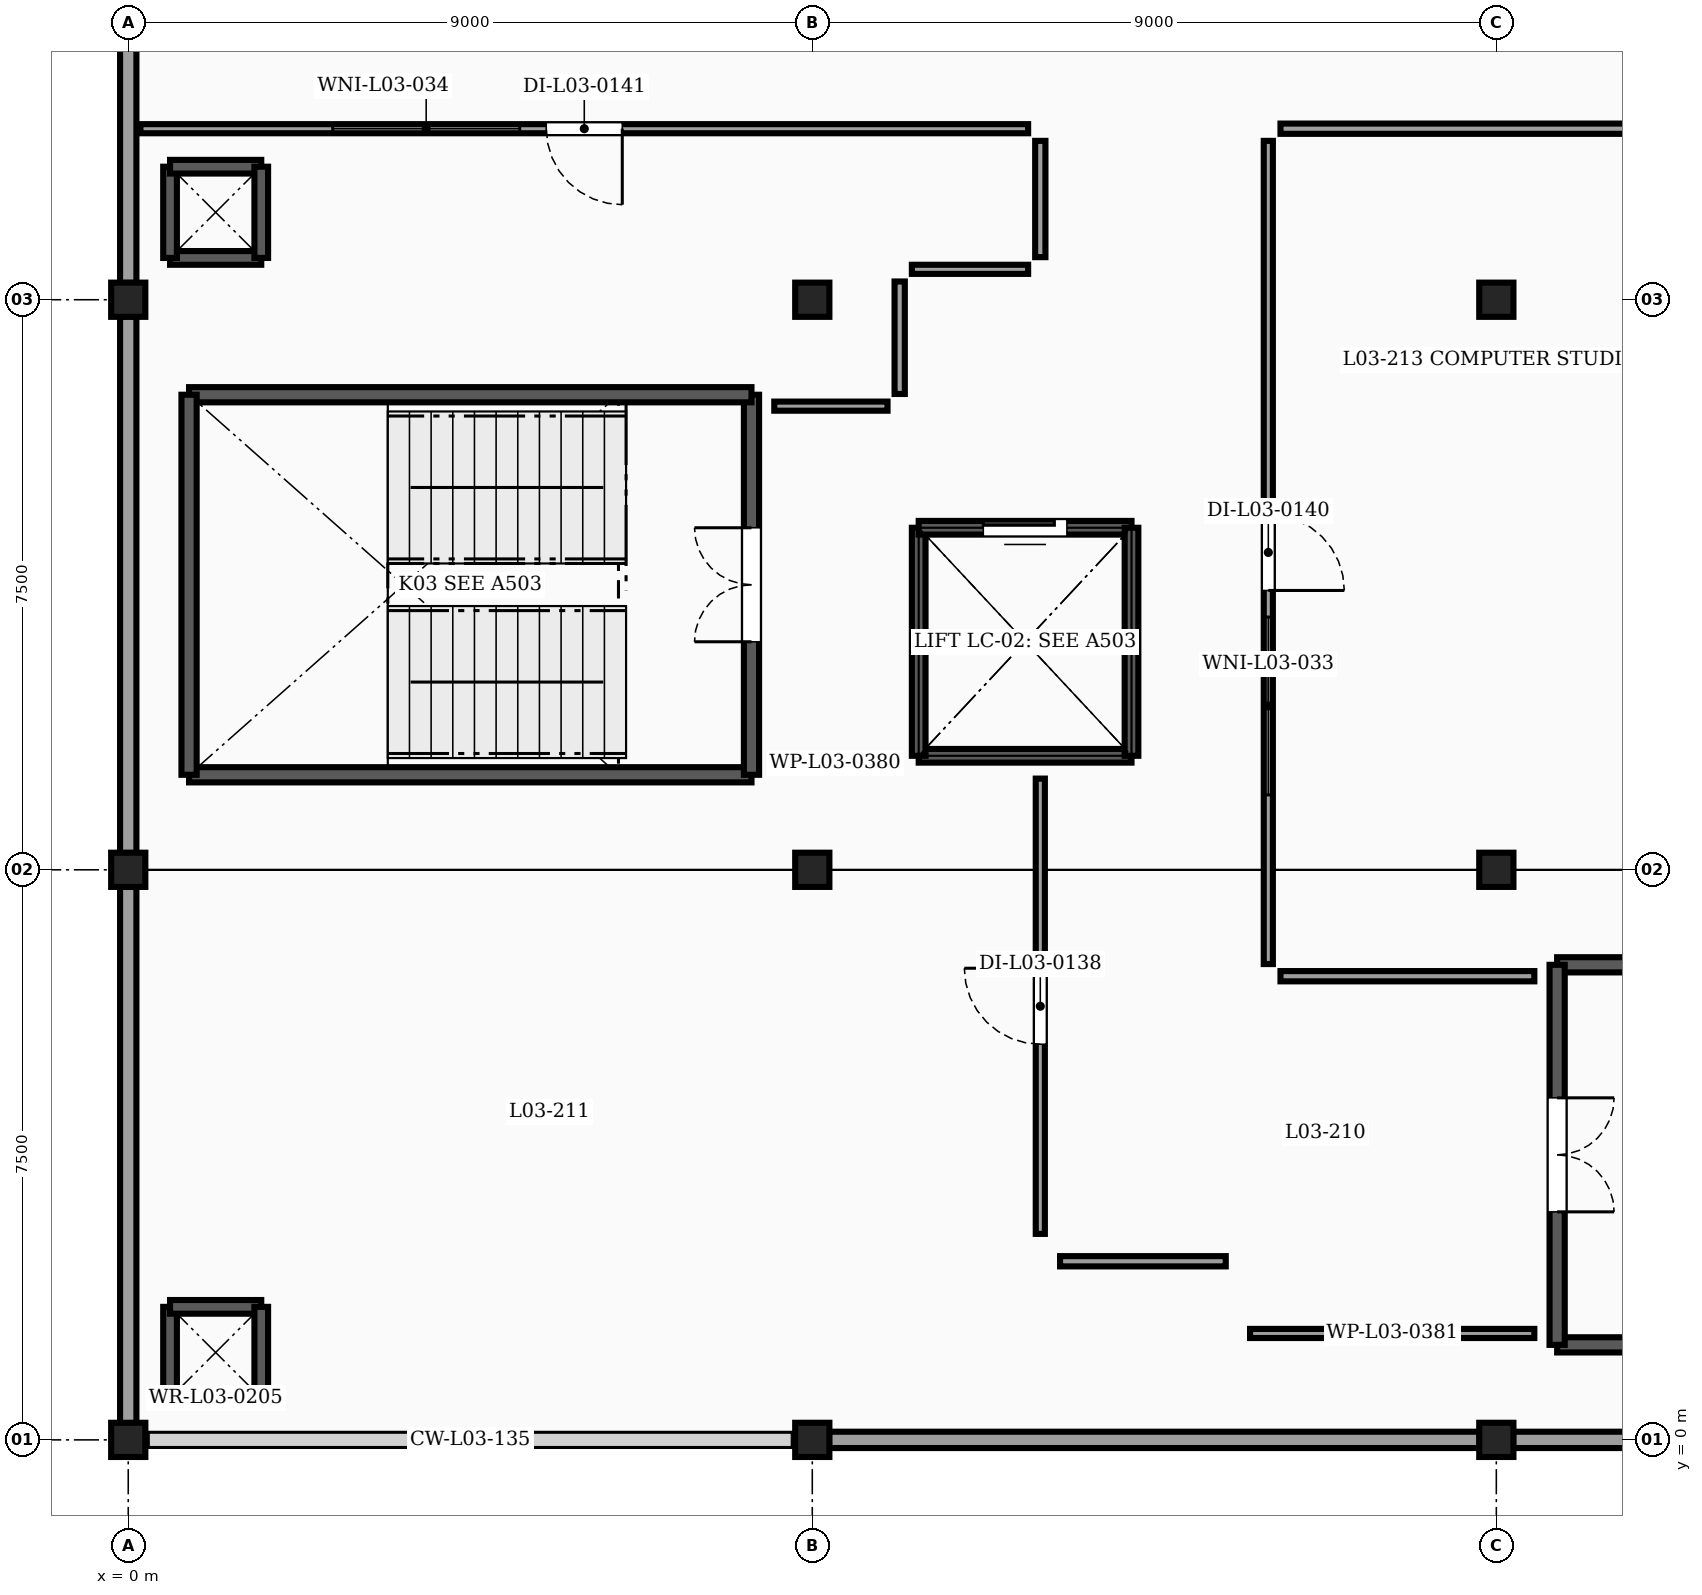
"""IFC4 building model, lengths in metres.
Left out: names, types, materials, properties, quantities, classifications, styles, units other than length and angle.
Written with IfcOpenShell. Run it as: python <this file> out.ifc"""

import sys

from ifc_helpers import new_model, si_unit, direction, frame, frame_2d, origin, origin_2d, place, context, subcontext, project, spatial, rectangle, extrude, element, fill, save


model = new_model("IFC4")
c1 = context("Model", 3, precision=1e-05, world=origin(), true_north=direction((0.0, 1.0)))
c2 = subcontext(c1, "Body", "Model", "MODEL_VIEW")
j1 = project(units=[si_unit("LENGTHUNIT", "METRE"), si_unit("PLANEANGLEUNIT", "RADIAN")], contexts=[c1])
p1 = place(None, origin())
s1 = spatial("IfcSite", under=j1, at=p1, CompositionType="ELEMENT")
p2 = place(p1, origin())
s2 = spatial("IfcBuilding", under=s1, at=p2, CompositionType="ELEMENT")
p3 = place(p2, frame((0.0, 0.0, 12.3)))
s3 = spatial("IfcBuildingStorey", under=s2, at=p3, CompositionType="ELEMENT", Elevation=12.3)
for number, where, z_axis, x_axis in (
    (1, (0.0, 0.0, 0.0), (0.0, 0.0, 1.0), (1.0, 0.0, 0.0)),
    (2, (9.0, 0.0, 0.0), (0.0, 0.0, 1.0), (1.0, 0.0, 0.0)),
    (3, (18.0, 0.0, 0.0), (0.0, 0.0, 1.0), (1.0, 0.0, 0.0)),
    (4, (0.0, 7.5, 0.0), (0.0, 0.0, 1.0), (1.0, 0.0, 0.0)),
    (5, (9.0, 7.5, 0.0), (0.0, 0.0, 1.0), (1.0, 0.0, 0.0)),
    (6, (18.0, 7.5, 0.0), (0.0, 0.0, 1.0), (1.0, 0.0, 0.0)),
    (7, (0.0, 15.0, 0.0), (0.0, 0.0, 1.0), (1.0, 0.0, 0.0)),
    (8, (9.0, 15.0, 0.0), (0.0, 0.0, 1.0), (1.0, 0.0, 0.0)),
    (9, (18.0, 15.0, 0.0), (0.0, 0.0, 1.0), (1.0, 0.0, 0.0)),
):
    element("IfcColumn", number, at=place(p3, frame(where, z_axis=z_axis, x_axis=x_axis)), inside=s3, PredefinedType="COLUMN", context=c2, shape_type="SweptSolid", body=[
        extrude(rectangle(XDim=0.45, YDim=0.45, at=origin_2d()), origin(), (0.0, 0.0, 1.0), 3.8),
    ])
for number, where, z_axis, x_axis in (
    (10, (26.779, 0.0, 0.0), (0.0, 0.0, 1.0), (-1.0, 0.0, 0.0)),
    (11, (17.779, 0.0, 0.0), (0.0, 0.0, 1.0), (-1.0, 0.0, 0.0)),
):
    element("IfcWall", number, at=place(p3, frame(where, z_axis=z_axis, x_axis=x_axis)), inside=s3, PredefinedType="SOLIDWALL", context=c2, shape_type="SweptSolid", body=[
        extrude(rectangle(XDim=8.558, YDim=0.215, at=frame_2d((4.279, 0.0))), origin(), (0.0, 0.0, 1.0), 2.997),
    ])
for number, where, z_axis, x_axis in (
    (12, (0.0, 0.221, 0.0), (0.0, 0.0, 1.0), (0.0, 1.0, 0.0)),
    (13, (0.0, 7.721, 0.0), (0.0, 0.0, 1.0), (0.0, 1.0, 0.0)),
    (14, (0.0, 15.221, 0.0), (0.0, 0.0, 1.0), (0.0, 1.0, 0.0)),
):
    element("IfcWall", number, at=place(p3, frame(where, z_axis=z_axis, x_axis=x_axis)), inside=s3, PredefinedType="SOLIDWALL", context=c2, shape_type="SweptSolid", body=[
        extrude(rectangle(XDim=7.058, YDim=0.215, at=frame_2d((3.529, 0.0))), origin(), (0.0, 0.0, 1.0), 2.997),
    ])
for number, where, z_axis, x_axis in (
    (15, (1.75, 0.55, 0.0), (0.0, 0.0, 1.0), (-1.0, 0.0, 0.0)),
    (16, (0.55, 0.55, 0.0), (0.0, 0.0, 1.0), (0.0, 1.0, 0.0)),
    (17, (0.55, 1.75, 0.0), (0.0, 0.0, 1.0), (1.0, 0.0, 0.0)),
    (18, (1.75, 1.75, 0.0), (0.0, 0.0, 1.0), (0.0, -1.0, 0.0)),
    (19, (1.75, 15.55, 0.0), (0.0, 0.0, 1.0), (-1.0, 0.0, 0.0)),
    (20, (0.55, 15.55, 0.0), (0.0, 0.0, 1.0), (0.0, 1.0, 0.0)),
    (21, (0.55, 16.75, 0.0), (0.0, 0.0, 1.0), (1.0, 0.0, 0.0)),
    (22, (1.75, 16.75, 0.0), (0.0, 0.0, 1.0), (0.0, -1.0, 0.0)),
):
    element("IfcWall", number, at=place(p3, frame(where, z_axis=z_axis, x_axis=x_axis)), inside=s3, PredefinedType="SHEAR", context=c2, shape_type="SweptSolid", body=[
        extrude(rectangle(XDim=1.2, YDim=0.18, at=frame_2d((0.6, 0.0))), origin(), (0.0, 0.0, 1.0), 3.59),
    ])
p4 = place(p3, frame((0.8, 8.75, 0.0), z_axis=(0.0, 0.0, 1.0), x_axis=(1.0, 0.0, 0.0)))
e23 = element("IfcWall", 23, at=p4, inside=s3, PredefinedType="SHEAR", context=c2, shape_type="SweptSolid", body=[
    extrude(rectangle(XDim=7.4, YDim=0.2, at=frame_2d((3.7, 0.0))), origin(), (0.0, 0.0, 1.0), 3.59),
])
p5 = place(p3, frame((8.2, 8.75, 0.0), z_axis=(0.0, 0.0, 1.0), x_axis=(0.0, 1.0, 0.0)))
e24 = element("IfcWall", 24, at=p5, inside=s3, PredefinedType="SHEAR", context=c2, shape_type="SweptSolid", body=[
    extrude(rectangle(XDim=5.0, YDim=0.2, at=frame_2d((2.5, 0.0))), origin(), (0.0, 0.0, 1.0), 3.59),
])
p6 = place(p5, frame((1.75, 0.0, 0.0)))
e25 = element("IfcOpeningElement", 25, at=p6, cuts=e24, PredefinedType="OPENING", context=c2, shape_type="SweptSolid", body=[
    extrude(rectangle(XDim=1.5, YDim=2.15, at=frame_2d((0.75, 1.075))), frame((0.0, 0.11, 0.0), z_axis=(0.0, -1.0, 0.0), x_axis=(1.0, 0.0, 0.0)), (0.0, 0.0, 1.0), 0.22),
])
p7 = place(p3, frame((8.2, 13.75, 0.0), z_axis=(0.0, 0.0, 1.0), x_axis=(-1.0, 0.0, 0.0)))
e26 = element("IfcWall", 26, at=p7, inside=s3, PredefinedType="SHEAR", context=c2, shape_type="SweptSolid", body=[
    extrude(rectangle(XDim=7.4, YDim=0.2, at=frame_2d((3.7, 0.0))), origin(), (0.0, 0.0, 1.0), 3.59),
])
p8 = place(p3, frame((0.8, 13.75, 0.0), z_axis=(0.0, 0.0, 1.0), x_axis=(0.0, -1.0, 0.0)))
e27 = element("IfcWall", 27, at=p8, inside=s3, PredefinedType="SHEAR", context=c2, shape_type="SweptSolid", body=[
    extrude(rectangle(XDim=5.0, YDim=0.2, at=frame_2d((2.5, 0.0))), origin(), (0.0, 0.0, 1.0), 3.59),
])
for number, where, z_axis, x_axis in (
    (28, (18.8, 1.25, 0.0), (0.0, 0.0, 1.0), (1.0, 0.0, 0.0)),
    (29, (26.2, 6.25, 0.0), (0.0, 0.0, 1.0), (-1.0, 0.0, 0.0)),
):
    element("IfcWall", number, at=place(p3, frame(where, z_axis=z_axis, x_axis=x_axis)), inside=s3, PredefinedType="SHEAR", context=c2, shape_type="SweptSolid", body=[
        extrude(rectangle(XDim=7.4, YDim=0.2, at=frame_2d((3.7, 0.0))), origin(), (0.0, 0.0, 1.0), 3.59),
    ])
p9 = place(p3, frame((18.8, 6.25, 0.0), z_axis=(0.0, 0.0, 1.0), x_axis=(0.0, -1.0, 0.0)))
e30 = element("IfcWall", 30, at=p9, inside=s3, PredefinedType="SHEAR", context=c2, shape_type="SweptSolid", body=[
    extrude(rectangle(XDim=5.0, YDim=0.2, at=frame_2d((2.5, 0.0))), origin(), (0.0, 0.0, 1.0), 3.59),
])
p10 = place(p9, frame((1.75, 0.0, 0.0)))
e31 = element("IfcOpeningElement", 31, at=p10, cuts=e30, PredefinedType="OPENING", context=c2, shape_type="SweptSolid", body=[
    extrude(rectangle(XDim=1.5, YDim=2.15, at=frame_2d((0.75, 1.075))), frame((0.0, 0.11, 0.0), z_axis=(0.0, -1.0, 0.0), x_axis=(1.0, 0.0, 0.0)), (0.0, 0.0, 1.0), 0.22),
])
p11 = place(p3, frame((13.2, 9.0, 0.0), z_axis=(0.0, 0.0, 1.0), x_axis=(-1.0, 0.0, 0.0)))
e32 = element("IfcWall", 32, at=p11, inside=s3, PredefinedType="SHEAR", context=c2, shape_type="SweptSolid", body=[
    extrude(rectangle(XDim=2.8, YDim=0.18, at=frame_2d((1.4, 0.0))), origin(), (0.0, 0.0, 1.0), 3.59),
])
p12 = place(p3, frame((10.4, 9.0, 0.0), z_axis=(0.0, 0.0, 1.0), x_axis=(0.0, 1.0, 0.0)))
e33 = element("IfcWall", 33, at=p12, inside=s3, PredefinedType="SHEAR", context=c2, shape_type="SweptSolid", body=[
    extrude(rectangle(XDim=3.0, YDim=0.18, at=frame_2d((1.5, 0.0))), origin(), (0.0, 0.0, 1.0), 3.59),
])
p13 = place(p3, frame((10.4, 12.0, 0.0), z_axis=(0.0, 0.0, 1.0), x_axis=(1.0, 0.0, 0.0)))
e34 = element("IfcWall", 34, at=p13, inside=s3, PredefinedType="SHEAR", context=c2, shape_type="SweptSolid", body=[
    extrude(rectangle(XDim=2.8, YDim=0.18, at=frame_2d((1.4, 0.0))), origin(), (0.0, 0.0, 1.0), 3.59),
])
p14 = place(p13, frame((0.85, 0.0, 0.0)))
e35 = element("IfcOpeningElement", 35, at=p14, cuts=e34, PredefinedType="OPENING", context=c2, shape_type="SweptSolid", body=[
    extrude(rectangle(XDim=1.1, YDim=2.15, at=frame_2d((0.55, 1.075))), frame((0.0, 0.1, 0.0), z_axis=(0.0, -1.0, 0.0), x_axis=(1.0, 0.0, 0.0)), (0.0, 0.0, 1.0), 0.2),
])
p15 = place(p3, frame((13.2, 12.0, 0.0), z_axis=(0.0, 0.0, 1.0), x_axis=(0.0, -1.0, 0.0)))
e36 = element("IfcWall", 36, at=p15, inside=s3, PredefinedType="SHEAR", context=c2, shape_type="SweptSolid", body=[
    extrude(rectangle(XDim=3.0, YDim=0.18, at=frame_2d((1.5, 0.0))), origin(), (0.0, 0.0, 1.0), 3.59),
])
p16 = place(p3, frame((10.1, 8.9, 0.0), z_axis=(0.0, 0.0, 1.0), x_axis=(-1.0, 0.0, 0.0)))
e37 = element("IfcWall", 37, at=p16, inside=s3, PredefinedType="PARTITIONING", context=c2, shape_type="SweptSolid", body=[
    extrude(rectangle(XDim=1.6, YDim=0.135, at=frame_2d((0.8, 0.0))), origin(), (0.0, 0.0, 1.0), 3.59),
])
p17 = place(p3, frame((18.5, 1.4, 0.0), z_axis=(0.0, 0.0, 1.0), x_axis=(-1.0, 0.0, 0.0)))
e38 = element("IfcWall", 38, at=p17, inside=s3, PredefinedType="PARTITIONING", context=c2, shape_type="SweptSolid", body=[
    extrude(rectangle(XDim=3.74, YDim=0.12, at=frame_2d((1.87, 0.0))), origin(), (0.0, 0.0, 1.0), 3.59),
])
p18 = place(p3, frame((14.44, 2.35, 0.0), z_axis=(0.0, 0.0, 1.0), x_axis=(-1.0, 0.0, 0.0)))
e39 = element("IfcWall", 39, at=p18, inside=s3, PredefinedType="PARTITIONING", context=c2, shape_type="SweptSolid", body=[
    extrude(rectangle(XDim=2.18, YDim=0.135, at=frame_2d((1.09, 0.0))), origin(), (0.0, 0.0, 1.0), 3.59),
])
p19 = place(p3, frame((12.0, 2.71, 0.0), z_axis=(0.0, 0.0, 1.0), x_axis=(0.0, 1.0, 0.0)))
e40 = element("IfcWall", 40, at=p19, inside=s3, PredefinedType="PARTITIONING", context=c2, shape_type="SweptSolid", body=[
    extrude(rectangle(XDim=5.99, YDim=0.12, at=frame_2d((2.995, 0.0))), origin(), (0.0, 0.0, 1.0), 3.222),
])
p20 = place(p19, frame((2.495, 0.0, 0.0)))
e41 = element("IfcOpeningElement", 41, at=p20, cuts=e40, PredefinedType="OPENING", context=c2, shape_type="SweptSolid", body=[
    extrude(rectangle(XDim=1.0, YDim=2.15, at=frame_2d((0.5, 1.075))), frame((0.0, 0.07, 0.0), z_axis=(0.0, -1.0, 0.0), x_axis=(1.0, 0.0, 0.0)), (0.0, 0.0, 1.0), 0.14),
])
p21 = place(p3, frame((20.84, 17.25, 0.0), z_axis=(0.0, 0.0, 1.0), x_axis=(-1.0, 0.0, 0.0)))
e42 = element("IfcWall", 42, at=p21, inside=s3, PredefinedType="PARTITIONING", context=c2, shape_type="SweptSolid", body=[
    extrude(rectangle(XDim=5.68, YDim=0.135, at=frame_2d((2.84, 0.0))), origin(), (0.0, 0.0, 1.0), 3.59),
])
p22 = place(p3, frame((15.0, 17.09, 0.0), z_axis=(0.0, 0.0, 1.0), x_axis=(0.0, -1.0, 0.0)))
e43 = element("IfcWall", 43, at=p22, inside=s3, PredefinedType="PARTITIONING", context=c2, shape_type="SweptSolid", body=[
    extrude(rectangle(XDim=10.83, YDim=0.12, at=frame_2d((5.415, 0.0))), origin(), (0.0, 0.0, 1.0), 3.222),
])
p23 = place(p22, frame((4.915, 0.0, 0.0)))
e44 = element("IfcOpeningElement", 44, at=p23, cuts=e43, PredefinedType="OPENING", context=c2, shape_type="SweptSolid", body=[
    extrude(rectangle(XDim=1.0, YDim=2.15, at=frame_2d((0.5, 1.075))), frame((0.0, 0.07, 0.0), z_axis=(0.0, -1.0, 0.0), x_axis=(1.0, 0.0, 0.0)), (0.0, 0.0, 1.0), 0.14),
])
p24 = place(p22, frame((6.265, 0.0, 1.02)))
e45 = element("IfcOpeningElement", 45, at=p24, cuts=e43, PredefinedType="OPENING", context=c2, shape_type="SweptSolid", body=[
    extrude(rectangle(XDim=2.34, YDim=1.18, at=frame_2d((1.17, 0.59))), frame((0.0, 0.07, 0.0), z_axis=(0.0, -1.0, 0.0), x_axis=(1.0, 0.0, 0.0)), (0.0, 0.0, 1.0), 0.14),
])
p25 = place(p3, frame((15.16, 6.1, 0.0), z_axis=(0.0, 0.0, 1.0), x_axis=(1.0, 0.0, 0.0)))
e46 = element("IfcWall", 46, at=p25, inside=s3, PredefinedType="PARTITIONING", context=c2, shape_type="SweptSolid", body=[
    extrude(rectangle(XDim=3.34, YDim=0.135, at=frame_2d((1.67, 0.0))), origin(), (0.0, 0.0, 1.0), 3.59),
])
p26 = place(p3, frame((8.5, 13.6, 0.0), z_axis=(0.0, 0.0, 1.0), x_axis=(1.0, 0.0, 0.0)))
e47 = element("IfcWall", 47, at=p26, inside=s3, PredefinedType="PARTITIONING", context=c2, shape_type="SweptSolid", body=[
    extrude(rectangle(XDim=1.49, YDim=0.12, at=frame_2d((0.745, 0.0))), origin(), (0.0, 0.0, 1.0), 3.59),
])
p27 = place(p3, frame((10.15, 13.76, 0.0), z_axis=(0.0, 0.0, 1.0), x_axis=(0.0, 1.0, 0.0)))
e48 = element("IfcWall", 48, at=p27, inside=s3, PredefinedType="PARTITIONING", context=c2, shape_type="SweptSolid", body=[
    extrude(rectangle(XDim=1.48, YDim=0.135, at=frame_2d((0.74, 0.0))), origin(), (0.0, 0.0, 1.0), 3.59),
])
p28 = place(p3, frame((10.31, 15.4, 0.0), z_axis=(0.0, 0.0, 1.0), x_axis=(1.0, 0.0, 0.0)))
e49 = element("IfcWall", 49, at=p28, inside=s3, PredefinedType="PARTITIONING", context=c2, shape_type="SweptSolid", body=[
    extrude(rectangle(XDim=1.53, YDim=0.12, at=frame_2d((0.765, 0.0))), origin(), (0.0, 0.0, 1.0), 3.59),
])
p29 = place(p3, frame((12.0, 15.56, 0.0), z_axis=(0.0, 0.0, 1.0), x_axis=(0.0, 1.0, 0.0)))
e50 = element("IfcWall", 50, at=p29, inside=s3, PredefinedType="PARTITIONING", context=c2, shape_type="SweptSolid", body=[
    extrude(rectangle(XDim=1.53, YDim=0.135, at=frame_2d((0.765, 0.0))), origin(), (0.0, 0.0, 1.0), 3.222),
])
p30 = place(p3, frame((11.84, 17.25, 0.0), z_axis=(0.0, 0.0, 1.0), x_axis=(-1.0, 0.0, 0.0)))
e51 = element("IfcWall", 51, at=p30, inside=s3, PredefinedType="PARTITIONING", context=c2, shape_type="SweptSolid", body=[
    extrude(rectangle(XDim=11.68, YDim=0.12, at=frame_2d((5.84, 0.0))), origin(), (0.0, 0.0, 1.0), 3.59),
])
p31 = place(p30, frame((5.34, 0.0, 0.0)))
e52 = element("IfcOpeningElement", 52, at=p31, cuts=e51, PredefinedType="OPENING", context=c2, shape_type="SweptSolid", body=[
    extrude(rectangle(XDim=1.0, YDim=2.15, at=frame_2d((0.5, 1.075))), frame((0.0, 0.07, 0.0), z_axis=(0.0, -1.0, 0.0), x_axis=(1.0, 0.0, 0.0)), (0.0, 0.0, 1.0), 0.14),
])
p32 = place(p30, frame((6.69, 0.0, 1.02)))
e53 = element("IfcOpeningElement", 53, at=p32, cuts=e51, PredefinedType="OPENING", context=c2, shape_type="SweptSolid", body=[
    extrude(rectangle(XDim=2.46, YDim=1.16, at=frame_2d((1.23, 0.58))), frame((0.0, 0.07, 0.0), z_axis=(0.0, -1.0, 0.0), x_axis=(1.0, 0.0, 0.0)), (0.0, 0.0, 1.0), 0.14),
])
p33 = place(p6, origin())
e54 = element("IfcDoor", 54, at=p33, inside=s3, OperationType="DOUBLE_DOOR_SINGLE_SWING", PredefinedType="DOOR", context=c2, shape_type="SweptSolid", body=[
    extrude(rectangle(XDim=1.5, YDim=2.15, at=frame_2d((0.75, 1.075))), frame((0.0, 0.025, 0.0), z_axis=(0.0, -1.0, 0.0), x_axis=(1.0, 0.0, 0.0)), (0.0, 0.0, 1.0), 0.05),
])
fill(e25, e54)
p34 = place(p10, origin())
e55 = element("IfcDoor", 55, at=p34, inside=s3, OperationType="DOUBLE_DOOR_SINGLE_SWING", PredefinedType="DOOR", context=c2, shape_type="SweptSolid", body=[
    extrude(rectangle(XDim=1.5, YDim=2.15, at=frame_2d((0.75, 1.075))), frame((0.0, 0.025, 0.0), z_axis=(0.0, -1.0, 0.0), x_axis=(1.0, 0.0, 0.0)), (0.0, 0.0, 1.0), 0.05),
])
fill(e31, e55)
p35 = place(p14, origin())
e56 = element("IfcDoor", 56, at=p35, inside=s3, OperationType="SLIDING_TO_LEFT", PredefinedType="DOOR", context=c2, shape_type="SweptSolid", body=[
    extrude(rectangle(XDim=1.1, YDim=2.15, at=frame_2d((0.55, 1.075))), frame((0.0, 0.025, 0.0), z_axis=(0.0, -1.0, 0.0), x_axis=(1.0, 0.0, 0.0)), (0.0, 0.0, 1.0), 0.05),
])
fill(e35, e56)
p36 = place(p20, origin())
e57 = element("IfcDoor", 57, at=p36, inside=s3, OperationType="SINGLE_SWING_RIGHT", PredefinedType="DOOR", context=c2, shape_type="SweptSolid", body=[
    extrude(rectangle(XDim=1.0, YDim=2.15, at=frame_2d((0.5, 1.075))), frame((0.0, 0.025, 0.0), z_axis=(0.0, -1.0, 0.0), x_axis=(1.0, 0.0, 0.0)), (0.0, 0.0, 1.0), 0.05),
])
fill(e41, e57)
p37 = place(p23, origin())
e58 = element("IfcDoor", 58, at=p37, inside=s3, OperationType="SINGLE_SWING_RIGHT", PredefinedType="DOOR", context=c2, shape_type="SweptSolid", body=[
    extrude(rectangle(XDim=1.0, YDim=2.15, at=frame_2d((0.5, 1.075))), frame((0.0, 0.025, 0.0), z_axis=(0.0, -1.0, 0.0), x_axis=(1.0, 0.0, 0.0)), (0.0, 0.0, 1.0), 0.05),
])
fill(e44, e58)
p38 = place(p24, origin())
e59 = element("IfcWindow", 59, at=p38, inside=s3, PartitioningType="DOUBLE_PANEL_VERTICAL", PredefinedType="WINDOW", context=c2, shape_type="SweptSolid", body=[
    extrude(rectangle(XDim=2.34, YDim=1.18, at=frame_2d((1.17, 0.59))), frame((0.0, 0.03, 0.0), z_axis=(0.0, -1.0, 0.0), x_axis=(1.0, 0.0, 0.0)), (0.0, 0.0, 1.0), 0.06),
])
fill(e45, e59)
p39 = place(p31, origin())
e60 = element("IfcDoor", 60, at=p39, inside=s3, OperationType="SINGLE_SWING_LEFT", PredefinedType="DOOR", context=c2, shape_type="SweptSolid", body=[
    extrude(rectangle(XDim=1.0, YDim=2.15, at=frame_2d((0.5, 1.075))), frame((0.0, 0.025, 0.0), z_axis=(0.0, -1.0, 0.0), x_axis=(1.0, 0.0, 0.0)), (0.0, 0.0, 1.0), 0.05),
])
fill(e52, e60)
p40 = place(p32, origin())
e61 = element("IfcWindow", 61, at=p40, inside=s3, PartitioningType="DOUBLE_PANEL_VERTICAL", PredefinedType="WINDOW", context=c2, shape_type="SweptSolid", body=[
    extrude(rectangle(XDim=2.46, YDim=1.16, at=frame_2d((1.23, 0.58))), frame((0.0, 0.03, 0.0), z_axis=(0.0, -1.0, 0.0), x_axis=(1.0, 0.0, 0.0)), (0.0, 0.0, 1.0), 0.06),
])
fill(e53, e61)
save(model, sys.argv[1])
